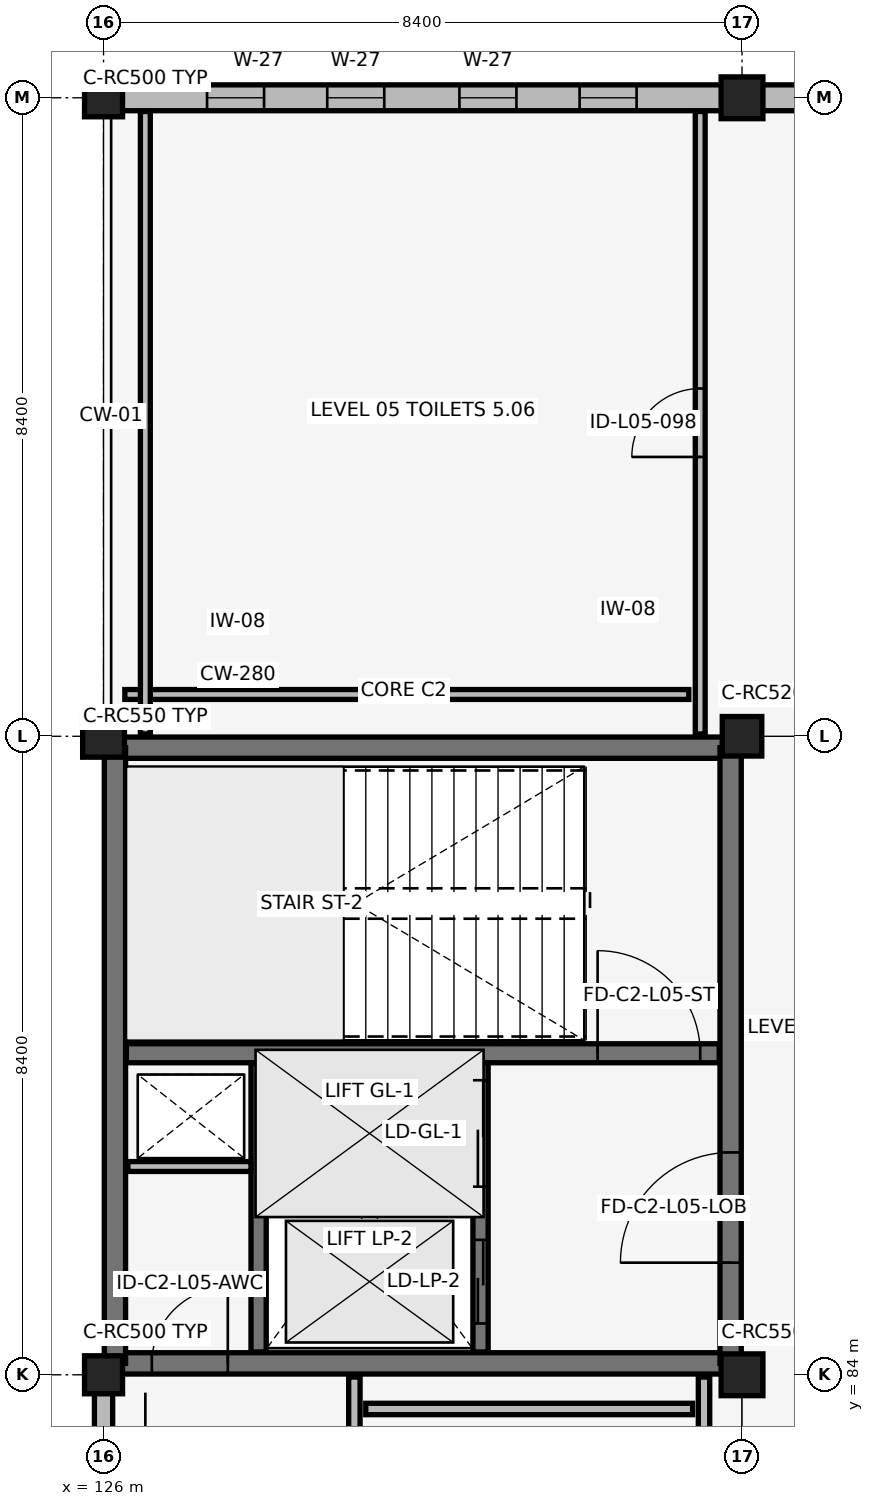
"""IFC4 building model, lengths in metres.
Left out: names, types, materials, properties, quantities, classifications, styles, units other than length and angle.
Written with IfcOpenShell. Run it as: python <this file> out.ifc"""

import sys

from ifc_helpers import new_model, si_unit, direction, frame, frame_2d, origin, origin_2d, place, context, subcontext, project, spatial, rectangle, extrude, element, fill, save


model = new_model("IFC4")
c1 = context("Model", 3, precision=1e-05, world=origin(), true_north=direction((0.0, 1.0)))
c2 = subcontext(c1, "Body", "Model", "MODEL_VIEW")
j1 = project(units=[si_unit("LENGTHUNIT", "METRE"), si_unit("PLANEANGLEUNIT", "RADIAN")], contexts=[c1])
p1 = place(None, origin())
s1 = spatial("IfcSite", under=j1, at=p1, CompositionType="ELEMENT")
p2 = place(p1, origin())
s2 = spatial("IfcBuilding", under=s1, at=p2, CompositionType="ELEMENT")
p3 = place(p2, frame((0.0, 0.0, 22.1)))
s3 = spatial("IfcBuildingStorey", under=s2, at=p3, CompositionType="ELEMENT", Elevation=22.1)
p4 = place(p3, frame((126.15, 84.15, 0.0), z_axis=(0.0, 0.0, 1.0), x_axis=(1.0, 0.0, 0.0)))
e1 = element("IfcWall", 1, at=p4, inside=s3, PredefinedType="SHEAR", context=c2, shape_type="SweptSolid", body=[
    extrude(rectangle(XDim=8.1, YDim=0.28, at=frame_2d((4.05, 0.0))), origin(), (0.0, 0.0, 1.0), 3.78),
])
p5 = place(p4, frame((0.485, 0.0, 0.0)))
e2 = element("IfcOpeningElement", 2, at=p5, cuts=e1, PredefinedType="OPENING", context=c2, shape_type="SweptSolid", body=[
    extrude(rectangle(XDim=1.0, YDim=2.15, at=frame_2d((0.5, 1.075))), frame((0.0, 0.15, 0.0), z_axis=(0.0, -1.0, 0.0), x_axis=(1.0, 0.0, 0.0)), (0.0, 0.0, 1.0), 0.3),
])
for number, where, z_axis, x_axis in (
    (3, (126.15, 92.25, 0.0), (0.0, 0.0, 1.0), (1.0, 0.0, 0.0)),
    (4, (126.15, 84.15, 0.0), (0.0, 0.0, 1.0), (0.0, 1.0, 0.0)),
):
    element("IfcWall", number, at=place(p3, frame(where, z_axis=z_axis, x_axis=x_axis)), inside=s3, PredefinedType="SHEAR", context=c2, shape_type="SweptSolid", body=[
        extrude(rectangle(XDim=8.1, YDim=0.28, at=frame_2d((4.05, 0.0))), origin(), (0.0, 0.0, 1.0), 3.78),
    ])
p6 = place(p3, frame((134.25, 84.15, 0.0), z_axis=(0.0, 0.0, 1.0), x_axis=(0.0, 1.0, 0.0)))
e5 = element("IfcWall", 5, at=p6, inside=s3, PredefinedType="SHEAR", context=c2, shape_type="SweptSolid", body=[
    extrude(rectangle(XDim=8.1, YDim=0.28, at=frame_2d((4.05, 0.0))), origin(), (0.0, 0.0, 1.0), 3.78),
])
p7 = place(p6, frame((1.325, 0.0, 0.0)))
e6 = element("IfcOpeningElement", 6, at=p7, cuts=e5, PredefinedType="OPENING", context=c2, shape_type="SweptSolid", body=[
    extrude(rectangle(XDim=1.45, YDim=2.15, at=frame_2d((0.725, 1.075))), frame((0.0, 0.15, 0.0), z_axis=(0.0, -1.0, 0.0), x_axis=(1.0, 0.0, 0.0)), (0.0, 0.0, 1.0), 0.3),
])
p8 = place(p3, frame((126.3, 88.23, 0.0), z_axis=(0.0, 0.0, 1.0), x_axis=(1.0, 0.0, 0.0)))
e7 = element("IfcWall", 7, at=p8, inside=s3, PredefinedType="SHEAR", context=c2, shape_type="SweptSolid", body=[
    extrude(rectangle(XDim=7.8, YDim=0.25, at=frame_2d((3.9, 0.0))), origin(), (0.0, 0.0, 1.0), 3.78),
])
p9 = place(p8, frame((6.2, 0.0, 0.0)))
e8 = element("IfcOpeningElement", 8, at=p9, cuts=e7, PredefinedType="OPENING", context=c2, shape_type="SweptSolid", body=[
    extrude(rectangle(XDim=1.35, YDim=2.15, at=frame_2d((0.675, 1.075))), frame((0.0, 0.135, 0.0), z_axis=(0.0, -1.0, 0.0), x_axis=(1.0, 0.0, 0.0)), (0.0, 0.0, 1.0), 0.27),
])
p10 = place(p3, frame((126.0, 84.0, 0.0), z_axis=(0.0, 0.0, 1.0), x_axis=(1.0, 0.0, 0.0)))
e9 = element("IfcColumn", 9, at=p10, inside=s3, PredefinedType="COLUMN", context=c2, shape_type="SweptSolid", body=[
    extrude(rectangle(XDim=0.5, YDim=0.5, at=origin_2d()), origin(), (0.0, 0.0, 1.0), 3.78),
])
p11 = place(p3, frame((126.0, 92.4, 0.0), z_axis=(0.0, 0.0, 1.0), x_axis=(1.0, 0.0, 0.0)))
e10 = element("IfcColumn", 10, at=p11, inside=s3, PredefinedType="COLUMN", context=c2, shape_type="SweptSolid", body=[
    extrude(rectangle(XDim=0.55, YDim=0.55, at=origin_2d()), origin(), (0.0, 0.0, 1.0), 3.78),
])
p12 = place(p3, frame((126.0, 100.8, 0.0), z_axis=(0.0, 0.0, 1.0), x_axis=(1.0, 0.0, 0.0)))
e11 = element("IfcColumn", 11, at=p12, inside=s3, PredefinedType="COLUMN", context=c2, shape_type="SweptSolid", body=[
    extrude(rectangle(XDim=0.5, YDim=0.5, at=origin_2d()), origin(), (0.0, 0.0, 1.0), 3.78),
])
p13 = place(p3, frame((134.4, 84.0, 0.0), z_axis=(0.0, 0.0, 1.0), x_axis=(1.0, 0.0, 0.0)))
e12 = element("IfcColumn", 12, at=p13, inside=s3, PredefinedType="COLUMN", context=c2, shape_type="SweptSolid", body=[
    extrude(rectangle(XDim=0.55, YDim=0.55, at=origin_2d()), origin(), (0.0, 0.0, 1.0), 3.78),
])
p14 = place(p3, frame((134.4, 92.4, 0.0), z_axis=(0.0, 0.0, 1.0), x_axis=(1.0, 0.0, 0.0)))
e13 = element("IfcColumn", 13, at=p14, inside=s3, PredefinedType="COLUMN", context=c2, shape_type="SweptSolid", body=[
    extrude(rectangle(XDim=0.52, YDim=0.52, at=origin_2d()), origin(), (0.0, 0.0, 1.0), 3.78),
])
p15 = place(p3, frame((134.4, 100.8, 0.0), z_axis=(0.0, 0.0, 1.0), x_axis=(1.0, 0.0, 0.0)))
e14 = element("IfcColumn", 14, at=p15, inside=s3, PredefinedType="COLUMN", context=c2, shape_type="SweptSolid", body=[
    extrude(rectangle(XDim=0.55, YDim=0.55, at=origin_2d()), origin(), (0.0, 0.0, 1.0), 3.78),
])
p16 = place(p3, frame((126.0, 75.86, 0.0), z_axis=(0.0, 0.0, 1.0), x_axis=(0.0, 1.0, 0.0)))
e15 = element("IfcWall", 15, at=p16, inside=s3, PredefinedType="SOLIDWALL", context=c2, shape_type="SweptSolid", body=[
    extrude(rectangle(XDim=7.905, YDim=0.24, at=frame_2d((3.952, 0.0))), origin(), (0.0, 0.0, 1.0), 3.18),
])
p17 = place(p16, frame((0.811, 0.0, 0.35)))
e16 = element("IfcOpeningElement", 16, at=p17, cuts=e15, PredefinedType="OPENING", context=c2, shape_type="SweptSolid", body=[
    extrude(rectangle(XDim=0.44, YDim=1.25, at=frame_2d((0.22, 0.625))), frame((0.0, 0.13, 0.0), z_axis=(0.0, -1.0, 0.0), x_axis=(1.0, 0.0, 0.0)), (0.0, 0.0, 1.0), 0.26),
])
p18 = place(p16, frame((2.271, 0.0, 0.35)))
e17 = element("IfcOpeningElement", 17, at=p18, cuts=e15, PredefinedType="OPENING", context=c2, shape_type="SweptSolid", body=[
    extrude(rectangle(XDim=0.44, YDim=1.25, at=frame_2d((0.22, 0.625))), frame((0.0, 0.13, 0.0), z_axis=(0.0, -1.0, 0.0), x_axis=(1.0, 0.0, 0.0)), (0.0, 0.0, 1.0), 0.26),
])
p19 = place(p16, frame((3.732, 0.0, 0.35)))
e18 = element("IfcOpeningElement", 18, at=p19, cuts=e15, PredefinedType="OPENING", context=c2, shape_type="SweptSolid", body=[
    extrude(rectangle(XDim=0.44, YDim=1.25, at=frame_2d((0.22, 0.625))), frame((0.0, 0.13, 0.0), z_axis=(0.0, -1.0, 0.0), x_axis=(1.0, 0.0, 0.0)), (0.0, 0.0, 1.0), 0.26),
])
p20 = place(p16, frame((5.194, 0.0, 0.35)))
e19 = element("IfcOpeningElement", 19, at=p20, cuts=e15, PredefinedType="OPENING", context=c2, shape_type="SweptSolid", body=[
    extrude(rectangle(XDim=0.44, YDim=1.25, at=frame_2d((0.22, 0.625))), frame((0.0, 0.13, 0.0), z_axis=(0.0, -1.0, 0.0), x_axis=(1.0, 0.0, 0.0)), (0.0, 0.0, 1.0), 0.26),
])
p21 = place(p16, frame((6.655, 0.0, 0.35)))
e20 = element("IfcOpeningElement", 20, at=p21, cuts=e15, PredefinedType="OPENING", context=c2, shape_type="SweptSolid", body=[
    extrude(rectangle(XDim=0.44, YDim=1.25, at=frame_2d((0.22, 0.625))), frame((0.0, 0.13, 0.0), z_axis=(0.0, -1.0, 0.0), x_axis=(1.0, 0.0, 0.0)), (0.0, 0.0, 1.0), 0.26),
])
p22 = place(p3, frame((126.235, 100.8, 0.0), z_axis=(0.0, 0.0, 1.0), x_axis=(1.0, 0.0, 0.0)))
e21 = element("IfcWall", 21, at=p22, inside=s3, PredefinedType="SOLIDWALL", context=c2, shape_type="SweptSolid", body=[
    extrude(rectangle(XDim=7.905, YDim=0.34, at=frame_2d((3.952, 0.0))), origin(), (0.0, 0.0, 1.0), 3.18),
])
p23 = place(p22, frame((1.127, 0.0, 0.7)))
e22 = element("IfcOpeningElement", 22, at=p23, cuts=e21, PredefinedType="OPENING", context=c2, shape_type="SweptSolid", body=[
    extrude(rectangle(XDim=0.75, YDim=2.1, at=frame_2d((0.375, 1.05))), frame((0.0, 0.18, 0.0), z_axis=(0.0, -1.0, 0.0), x_axis=(1.0, 0.0, 0.0)), (0.0, 0.0, 1.0), 0.36),
])
p24 = place(p22, frame((2.708, 0.0, 0.7)))
e23 = element("IfcOpeningElement", 23, at=p24, cuts=e21, PredefinedType="OPENING", context=c2, shape_type="SweptSolid", body=[
    extrude(rectangle(XDim=0.75, YDim=2.1, at=frame_2d((0.375, 1.05))), frame((0.0, 0.18, 0.0), z_axis=(0.0, -1.0, 0.0), x_axis=(1.0, 0.0, 0.0)), (0.0, 0.0, 1.0), 0.36),
])
p25 = place(p22, frame((4.447, 0.0, 0.7)))
e24 = element("IfcOpeningElement", 24, at=p25, cuts=e21, PredefinedType="OPENING", context=c2, shape_type="SweptSolid", body=[
    extrude(rectangle(XDim=0.75, YDim=2.1, at=frame_2d((0.375, 1.05))), frame((0.0, 0.18, 0.0), z_axis=(0.0, -1.0, 0.0), x_axis=(1.0, 0.0, 0.0)), (0.0, 0.0, 1.0), 0.36),
])
p26 = place(p22, frame((6.028, 0.0, 0.7)))
e25 = element("IfcOpeningElement", 25, at=p26, cuts=e21, PredefinedType="OPENING", context=c2, shape_type="SweptSolid", body=[
    extrude(rectangle(XDim=0.75, YDim=2.1, at=frame_2d((0.375, 1.05))), frame((0.0, 0.18, 0.0), z_axis=(0.0, -1.0, 0.0), x_axis=(1.0, 0.0, 0.0)), (0.0, 0.0, 1.0), 0.36),
])
p27 = place(p3, frame((134.66, 100.8, 0.0), z_axis=(0.0, 0.0, 1.0), x_axis=(1.0, 0.0, 0.0)))
e26 = element("IfcWall", 26, at=p27, inside=s3, PredefinedType="SOLIDWALL", context=c2, shape_type="SweptSolid", body=[
    extrude(rectangle(XDim=7.905, YDim=0.34, at=frame_2d((3.953, 0.0))), origin(), (0.0, 0.0, 1.0), 3.18),
])
p28 = place(p27, frame((1.127, 0.0, 0.7)))
e27 = element("IfcOpeningElement", 27, at=p28, cuts=e26, PredefinedType="OPENING", context=c2, shape_type="SweptSolid", body=[
    extrude(rectangle(XDim=0.75, YDim=2.1, at=frame_2d((0.375, 1.05))), frame((0.0, 0.18, 0.0), z_axis=(0.0, -1.0, 0.0), x_axis=(1.0, 0.0, 0.0)), (0.0, 0.0, 1.0), 0.36),
])
p29 = place(p27, frame((4.447, 0.0, 0.7)))
e28 = element("IfcOpeningElement", 28, at=p29, cuts=e26, PredefinedType="OPENING", context=c2, shape_type="SweptSolid", body=[
    extrude(rectangle(XDim=0.75, YDim=2.1, at=frame_2d((0.375, 1.05))), frame((0.0, 0.18, 0.0), z_axis=(0.0, -1.0, 0.0), x_axis=(1.0, 0.0, 0.0)), (0.0, 0.0, 1.0), 0.36),
])
p30 = place(p27, frame((6.028, 0.0, 0.7)))
e29 = element("IfcOpeningElement", 29, at=p30, cuts=e26, PredefinedType="OPENING", context=c2, shape_type="SweptSolid", body=[
    extrude(rectangle(XDim=0.75, YDim=2.1, at=frame_2d((0.375, 1.05))), frame((0.0, 0.18, 0.0), z_axis=(0.0, -1.0, 0.0), x_axis=(1.0, 0.0, 0.0)), (0.0, 0.0, 1.0), 0.36),
])
p31 = place(p3, frame((130.96, 84.3, 0.0), z_axis=(0.0, 0.0, 1.0), x_axis=(0.0, 1.0, 0.0)))
e30 = element("IfcWall", 30, at=p31, inside=s3, PredefinedType="SHEAR", context=c2, shape_type="SweptSolid", body=[
    extrude(rectangle(XDim=3.8, YDim=0.2, at=frame_2d((1.9, 0.0))), origin(), (0.0, 0.0, 1.0), 3.08),
])
p32 = place(p31, frame((0.375, 0.0, 0.0)))
e31 = element("IfcOpeningElement", 31, at=p32, cuts=e30, PredefinedType="OPENING", context=c2, shape_type="SweptSolid", body=[
    extrude(rectangle(XDim=1.1, YDim=2.15, at=frame_2d((0.55, 1.075))), frame((0.0, 0.11, 0.0), z_axis=(0.0, -1.0, 0.0), x_axis=(1.0, 0.0, 0.0)), (0.0, 0.0, 1.0), 0.22),
])
p33 = place(p31, frame((2.175, 0.0, 0.0)))
e32 = element("IfcOpeningElement", 32, at=p33, cuts=e30, PredefinedType="OPENING", context=c2, shape_type="SweptSolid", body=[
    extrude(rectangle(XDim=1.4, YDim=2.2, at=frame_2d((0.7, 1.1))), frame((0.0, 0.11, 0.0), z_axis=(0.0, -1.0, 0.0), x_axis=(1.0, 0.0, 0.0)), (0.0, 0.0, 1.0), 0.22),
])
p34 = place(p3, frame((128.04, 84.3, 0.0), z_axis=(0.0, 0.0, 1.0), x_axis=(0.0, 1.0, 0.0)))
e33 = element("IfcWall", 33, at=p34, inside=s3, PredefinedType="SHEAR", context=c2, shape_type="SweptSolid", body=[
    extrude(rectangle(XDim=3.8, YDim=0.2, at=frame_2d((1.9, 0.0))), origin(), (0.0, 0.0, 1.0), 3.08),
])
p35 = place(p3, frame((128.15, 86.2, 0.0), z_axis=(0.0, 0.0, 1.0), x_axis=(1.0, 0.0, 0.0)))
e34 = element("IfcWall", 34, at=p35, inside=s3, PredefinedType="SHEAR", context=c2, shape_type="SweptSolid", body=[
    extrude(rectangle(XDim=2.7, YDim=0.18, at=frame_2d((1.35, 0.0))), origin(), (0.0, 0.0, 1.0), 3.78),
])
p36 = place(p3, frame((126.32, 86.74, 0.0), z_axis=(0.0, 0.0, 1.0), x_axis=(1.0, 0.0, 0.0)))
e35 = element("IfcWall", 35, at=p36, inside=s3, PredefinedType="PARTITIONING", context=c2, shape_type="SweptSolid", body=[
    extrude(rectangle(XDim=1.62, YDim=0.13, at=frame_2d((0.81, 0.0))), origin(), (0.0, 0.0, 1.0), 3.78),
])
for number, where, z_axis, x_axis in (
    (36, (129.3, 36.7, 0.0), (0.0, 0.0, 1.0), (0.0, 1.0, 0.0)),
    (37, (133.9, 36.7, 0.0), (0.0, 0.0, 1.0), (0.0, 1.0, 0.0)),
):
    element("IfcWall", number, at=place(p3, frame(where, z_axis=z_axis, x_axis=x_axis)), inside=s3, PredefinedType="PARTITIONING", context=c2, shape_type="SweptSolid", body=[
        extrude(rectangle(XDim=47.27, YDim=0.15, at=frame_2d((23.635, 0.0))), origin(), (0.0, 0.0, 1.0), 3.08),
    ])
p37 = place(p3, frame((129.45, 83.55, 0.0), z_axis=(0.0, 0.0, 1.0), x_axis=(1.0, 0.0, 0.0)))
e38 = element("IfcWall", 38, at=p37, inside=s3, PredefinedType="PARTITIONING", context=c2, shape_type="SweptSolid", body=[
    extrude(rectangle(XDim=4.3, YDim=0.15, at=frame_2d((2.15, 0.0))), origin(), (0.0, 0.0, 1.0), 3.78),
])
p38 = place(p3, frame((133.85, 92.43, 0.0), z_axis=(0.0, 0.0, 1.0), x_axis=(0.0, 1.0, 0.0)))
e39 = element("IfcWall", 39, at=p38, inside=s3, PredefinedType="PARTITIONING", context=c2, shape_type="SweptSolid", body=[
    extrude(rectangle(XDim=8.19, YDim=0.13, at=frame_2d((4.095, 0.0))), origin(), (0.0, 0.0, 1.0), 3.16),
])
p39 = place(p38, frame((3.645, 0.0, 0.0)))
e40 = element("IfcOpeningElement", 40, at=p39, cuts=e39, PredefinedType="OPENING", context=c2, shape_type="SweptSolid", body=[
    extrude(rectangle(XDim=0.9, YDim=2.1, at=frame_2d((0.45, 1.05))), frame((0.0, 0.075, 0.0), z_axis=(0.0, -1.0, 0.0), x_axis=(1.0, 0.0, 0.0)), (0.0, 0.0, 1.0), 0.15),
])
p40 = place(p3, frame((126.28, 92.95, 0.0), z_axis=(0.0, 0.0, 1.0), x_axis=(1.0, 0.0, 0.0)))
e41 = element("IfcWall", 41, at=p40, inside=s3, PredefinedType="PARTITIONING", context=c2, shape_type="SweptSolid", body=[
    extrude(rectangle(XDim=7.42, YDim=0.13, at=frame_2d((3.71, 0.0))), origin(), (0.0, 0.0, 1.0), 3.18),
])
p41 = place(p3, frame((126.55, 92.43, 0.0), z_axis=(0.0, 0.0, 1.0), x_axis=(0.0, 1.0, 0.0)))
e42 = element("IfcWall", 42, at=p41, inside=s3, PredefinedType="PARTITIONING", context=c2, shape_type="SweptSolid", body=[
    extrude(rectangle(XDim=8.19, YDim=0.13, at=frame_2d((4.095, 0.0))), origin(), (0.0, 0.0, 1.0), 3.16),
])
p42 = place(p23, origin())
e43 = element("IfcWindow", 43, at=p42, inside=s3, PartitioningType="DOUBLE_PANEL_VERTICAL", PredefinedType="WINDOW", context=c2, shape_type="SweptSolid", body=[
    extrude(rectangle(XDim=0.75, YDim=2.1, at=frame_2d((0.375, 1.05))), frame((0.0, 0.03, 0.0), z_axis=(0.0, -1.0, 0.0), x_axis=(1.0, 0.0, 0.0)), (0.0, 0.0, 1.0), 0.06),
])
fill(e22, e43)
p43 = place(p24, origin())
e44 = element("IfcWindow", 44, at=p43, inside=s3, PartitioningType="DOUBLE_PANEL_VERTICAL", PredefinedType="WINDOW", context=c2, shape_type="SweptSolid", body=[
    extrude(rectangle(XDim=0.75, YDim=2.1, at=frame_2d((0.375, 1.05))), frame((0.0, 0.03, 0.0), z_axis=(0.0, -1.0, 0.0), x_axis=(1.0, 0.0, 0.0)), (0.0, 0.0, 1.0), 0.06),
])
fill(e23, e44)
p44 = place(p25, origin())
e45 = element("IfcWindow", 45, at=p44, inside=s3, PartitioningType="DOUBLE_PANEL_VERTICAL", PredefinedType="WINDOW", context=c2, shape_type="SweptSolid", body=[
    extrude(rectangle(XDim=0.75, YDim=2.1, at=frame_2d((0.375, 1.05))), frame((0.0, 0.03, 0.0), z_axis=(0.0, -1.0, 0.0), x_axis=(1.0, 0.0, 0.0)), (0.0, 0.0, 1.0), 0.06),
])
fill(e24, e45)
p45 = place(p26, origin())
e46 = element("IfcWindow", 46, at=p45, inside=s3, PartitioningType="DOUBLE_PANEL_VERTICAL", PredefinedType="WINDOW", context=c2, shape_type="SweptSolid", body=[
    extrude(rectangle(XDim=0.75, YDim=2.1, at=frame_2d((0.375, 1.05))), frame((0.0, 0.03, 0.0), z_axis=(0.0, -1.0, 0.0), x_axis=(1.0, 0.0, 0.0)), (0.0, 0.0, 1.0), 0.06),
])
fill(e25, e46)
p46 = place(p9, origin())
e47 = element("IfcDoor", 47, at=p46, inside=s3, OperationType="SINGLE_SWING_LEFT", PredefinedType="DOOR", context=c2, shape_type="SweptSolid", body=[
    extrude(rectangle(XDim=1.35, YDim=2.15, at=frame_2d((0.675, 1.075))), frame((0.0, 0.025, 0.0), z_axis=(0.0, -1.0, 0.0), x_axis=(1.0, 0.0, 0.0)), (0.0, 0.0, 1.0), 0.05),
])
fill(e8, e47)
p47 = place(p32, origin())
e48 = element("IfcDoor", 48, at=p47, inside=s3, OperationType="SLIDING_TO_LEFT", PredefinedType="DOOR", context=c2, shape_type="SweptSolid", body=[
    extrude(rectangle(XDim=1.1, YDim=2.15, at=frame_2d((0.55, 1.075))), frame((0.0, 0.025, 0.0), z_axis=(0.0, -1.0, 0.0), x_axis=(1.0, 0.0, 0.0)), (0.0, 0.0, 1.0), 0.05),
])
fill(e31, e48)
p48 = place(p33, origin())
e49 = element("IfcDoor", 49, at=p48, inside=s3, OperationType="SLIDING_TO_LEFT", PredefinedType="DOOR", context=c2, shape_type="SweptSolid", body=[
    extrude(rectangle(XDim=1.4, YDim=2.2, at=frame_2d((0.7, 1.1))), frame((0.0, 0.025, 0.0), z_axis=(0.0, -1.0, 0.0), x_axis=(1.0, 0.0, 0.0)), (0.0, 0.0, 1.0), 0.05),
])
fill(e32, e49)
p49 = place(p7, origin())
e50 = element("IfcDoor", 50, at=p49, inside=s3, OperationType="DOUBLE_DOOR_SINGLE_SWING", PredefinedType="DOOR", context=c2, shape_type="SweptSolid", body=[
    extrude(rectangle(XDim=1.45, YDim=2.15, at=frame_2d((0.725, 1.075))), frame((0.0, 0.025, 0.0), z_axis=(0.0, -1.0, 0.0), x_axis=(1.0, 0.0, 0.0)), (0.0, 0.0, 1.0), 0.05),
])
fill(e6, e50)
p50 = place(p5, origin())
e51 = element("IfcDoor", 51, at=p50, inside=s3, OperationType="SINGLE_SWING_RIGHT", PredefinedType="DOOR", context=c2, shape_type="SweptSolid", body=[
    extrude(rectangle(XDim=1.0, YDim=2.15, at=frame_2d((0.5, 1.075))), frame((0.0, 0.025, 0.0), z_axis=(0.0, -1.0, 0.0), x_axis=(1.0, 0.0, 0.0)), (0.0, 0.0, 1.0), 0.05),
])
fill(e2, e51)
p51 = place(p39, origin())
e52 = element("IfcDoor", 52, at=p51, inside=s3, OperationType="SINGLE_SWING_LEFT", PredefinedType="DOOR", context=c2, shape_type="SweptSolid", body=[
    extrude(rectangle(XDim=0.9, YDim=2.1, at=frame_2d((0.45, 1.05))), frame((0.0, 0.025, 0.0), z_axis=(0.0, -1.0, 0.0), x_axis=(1.0, 0.0, 0.0)), (0.0, 0.0, 1.0), 0.05),
])
fill(e40, e52)
save(model, sys.argv[1])
